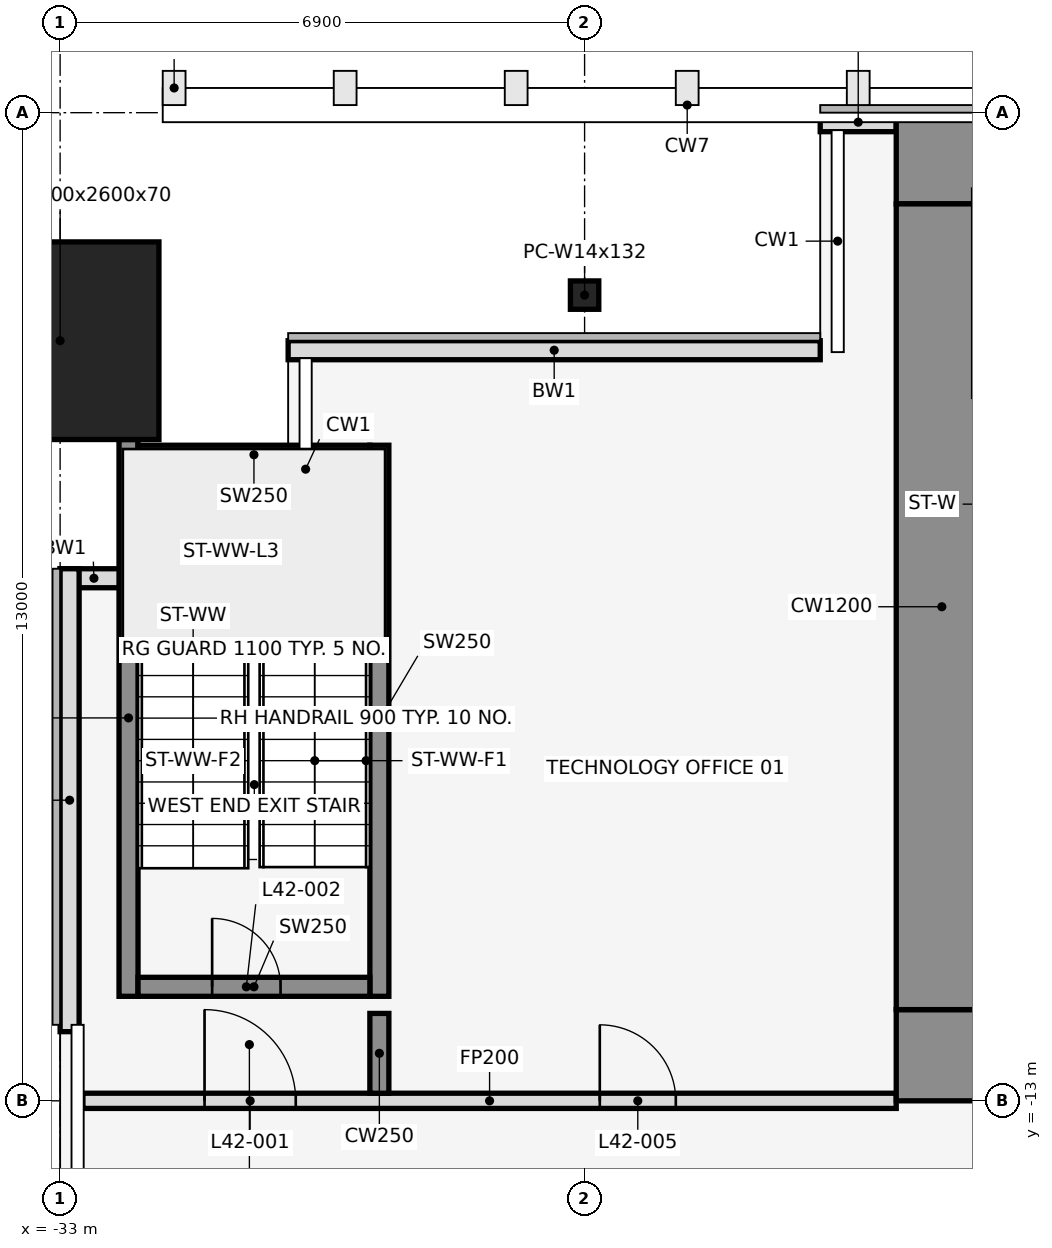
"""IFC4 building model, lengths in metres.
Left out: names, types, materials, properties, quantities, classifications, styles, units other than length and angle.
Written with IfcOpenShell. Run it as: python <this file> out.ifc"""

import sys

from ifc_helpers import new_model, si_unit, direction, frame, frame_2d, origin, origin_2d, place, context, subcontext, project, spatial, rectangle, hollow_rectangle, i_section, extrude, element, fill, save


model = new_model("IFC4")
c1 = context("Model", 3, precision=1e-05, world=origin(), true_north=direction((0.0, 1.0)))
c2 = subcontext(c1, "Body", "Model", "MODEL_VIEW")
j1 = project(units=[si_unit("LENGTHUNIT", "METRE"), si_unit("PLANEANGLEUNIT", "RADIAN")], contexts=[c1])
p1 = place(None, origin())
s1 = spatial("IfcSite", under=j1, at=p1, CompositionType="ELEMENT")
p2 = place(p1, origin())
s2 = spatial("IfcBuilding", under=s1, at=p2, CompositionType="ELEMENT")
p3 = place(p2, frame((0.0, 0.0, 190.9)))
s3 = spatial("IfcBuildingStorey", under=s2, at=p3, CompositionType="ELEMENT", Elevation=190.9)
p4 = place(p3, frame((-33.0, -3.0, 0.0), z_axis=(0.0, 0.0, 1.0), x_axis=(1.0, 0.0, 0.0)))
e1 = element("IfcColumn", 1, at=p4, inside=s3, PredefinedType="COLUMN", context=c2, shape_type="SweptSolid", body=[
    extrude(hollow_rectangle(XDim=2.6, YDim=2.6, WallThickness=0.07, at=origin_2d()), origin(), (0.0, 0.0, 1.0), 4.1),
])
p5 = place(p3, frame((-26.1, -2.4, 0.0), z_axis=(0.0, 0.0, 1.0), x_axis=(1.0, 0.0, 0.0)))
e2 = element("IfcColumn", 2, at=p5, inside=s3, PredefinedType="COLUMN", context=c2, shape_type="SweptSolid", body=[
    extrude(i_section(OverallWidth=0.373, OverallDepth=0.373, WebThickness=0.016, FlangeThickness=0.026, at=origin_2d()), origin(), (0.0, 0.0, 1.0), 4.1),
])
p6 = place(p3, frame((-22.0, -0.125, 0.0), z_axis=(0.0, 0.0, 1.0), x_axis=(-1.0, 0.0, 0.0)))
e3 = element("IfcWall", 3, at=p6, inside=s3, PredefinedType="STANDARD", context=c2, shape_type="SweptSolid", body=[
    extrude(rectangle(XDim=1.0, YDim=0.25, at=frame_2d((0.5, 0.0))), origin(), (0.0, 0.0, 1.0), 3.95),
])
p7 = place(p3, frame((-23.0, -3.125, 0.0), z_axis=(0.0, 0.0, 1.0), x_axis=(-1.0, 0.0, 0.0)))
e4 = element("IfcWall", 4, at=p7, inside=s3, PredefinedType="STANDARD", context=c2, shape_type="SweptSolid", body=[
    extrude(rectangle(XDim=7.0, YDim=0.25, at=frame_2d((3.5, 0.0))), origin(), (0.0, 0.0, 1.0), 3.95),
])
p8 = place(p3, frame((-32.11, -6.125, 0.0), z_axis=(0.0, 0.0, 1.0), x_axis=(-1.0, 0.0, 0.0)))
e5 = element("IfcWall", 5, at=p8, inside=s3, PredefinedType="STANDARD", context=c2, shape_type="SweptSolid", body=[
    extrude(rectangle(XDim=0.89, YDim=0.25, at=frame_2d((0.445, 0.0))), origin(), (0.0, 0.0, 1.0), 3.95),
])
p9 = place(p3, frame((-32.875, -6.0, 0.0), z_axis=(0.0, 0.0, 1.0), x_axis=(0.0, -1.0, 0.0)))
e6 = element("IfcWall", 6, at=p9, inside=s3, PredefinedType="STANDARD", context=c2, shape_type="SweptSolid", body=[
    extrude(rectangle(XDim=6.09, YDim=0.25, at=frame_2d((3.045, 0.0))), origin(), (0.0, 0.0, 1.0), 3.95),
])
p10 = place(p3, frame((-32.1, -11.625, 0.0), z_axis=(0.0, 0.0, 1.0), x_axis=(0.0, 1.0, 0.0)))
e7 = element("IfcWall", 7, at=p10, inside=s3, PredefinedType="SHEAR", context=c2, shape_type="SweptSolid", body=[
    extrude(rectangle(XDim=7.325, YDim=0.25, at=frame_2d((3.663, 0.0))), origin(), (0.0, 0.0, 1.0), 4.1),
])
p11 = place(p3, frame((-28.8, -11.625, 0.0), z_axis=(0.0, 0.0, 1.0), x_axis=(0.0, 1.0, 0.0)))
e8 = element("IfcWall", 8, at=p11, inside=s3, PredefinedType="SHEAR", context=c2, shape_type="SweptSolid", body=[
    extrude(rectangle(XDim=7.25, YDim=0.25, at=frame_2d((3.625, 0.0))), origin(), (0.0, 0.0, 1.0), 4.1),
])
p12 = place(p3, frame((-31.975, -11.5, 0.0), z_axis=(0.0, 0.0, 1.0), x_axis=(1.0, 0.0, 0.0)))
e9 = element("IfcWall", 9, at=p12, inside=s3, PredefinedType="SHEAR", context=c2, shape_type="SweptSolid", body=[
    extrude(rectangle(XDim=3.05, YDim=0.25, at=frame_2d((1.525, 0.0))), origin(), (0.0, 0.0, 1.0), 4.1),
])
p13 = place(p12, frame((0.975, 0.0, 0.0)))
e10 = element("IfcOpeningElement", 10, at=p13, cuts=e9, PredefinedType="OPENING", context=c2, shape_type="SweptSolid", body=[
    extrude(rectangle(XDim=0.9, YDim=2.1, at=frame_2d((0.45, 1.05))), frame((0.0, 0.137, 0.0), z_axis=(0.0, -1.0, 0.0), x_axis=(1.0, 0.0, 0.0)), (0.0, 0.0, 1.0), 0.274),
])
p14 = place(p3, frame((-31.975, -4.5, 0.0), z_axis=(0.0, 0.0, 1.0), x_axis=(1.0, 0.0, 0.0)))
e11 = element("IfcWall", 11, at=p14, inside=s3, PredefinedType="SHEAR", context=c2, shape_type="SweptSolid", body=[
    extrude(rectangle(XDim=3.05, YDim=0.25, at=frame_2d((1.525, 0.0))), origin(), (0.0, 0.0, 1.0), 4.1),
])
p15 = place(p3, frame((-32.7, -13.0, 0.0), z_axis=(0.0, 0.0, 1.0), x_axis=(1.0, 0.0, 0.0)))
e12 = element("IfcWall", 12, at=p15, inside=s3, PredefinedType="PARTITIONING", context=c2, shape_type="SweptSolid", body=[
    extrude(rectangle(XDim=10.7, YDim=0.2, at=frame_2d((5.35, 0.0))), origin(), (0.0, 0.0, 1.0), 2.96),
])
p16 = place(p15, frame((1.6, 0.0, 0.0)))
e13 = element("IfcOpeningElement", 13, at=p16, cuts=e12, PredefinedType="OPENING", context=c2, shape_type="SweptSolid", body=[
    extrude(rectangle(XDim=1.2, YDim=2.1, at=frame_2d((0.6, 1.05))), frame((0.0, 0.112, 0.0), z_axis=(0.0, -1.0, 0.0), x_axis=(1.0, 0.0, 0.0)), (0.0, 0.0, 1.0), 0.224),
])
p17 = place(p15, frame((6.8, 0.0, 0.0)))
e14 = element("IfcOpeningElement", 14, at=p17, cuts=e12, PredefinedType="OPENING", context=c2, shape_type="SweptSolid", body=[
    extrude(rectangle(XDim=1.0, YDim=2.1, at=frame_2d((0.5, 1.05))), frame((0.0, 0.112, 0.0), z_axis=(0.0, -1.0, 0.0), x_axis=(1.0, 0.0, 0.0)), (0.0, 0.0, 1.0), 0.224),
])
p18 = place(p3, frame((-28.8, -12.9, 0.0), z_axis=(0.0, 0.0, 1.0), x_axis=(0.0, 1.0, 0.0)))
e15 = element("IfcWall", 15, at=p18, inside=s3, PredefinedType="SHEAR", context=c2, shape_type="SweptSolid", body=[
    extrude(rectangle(XDim=1.05, YDim=0.25, at=frame_2d((0.525, 0.0))), origin(), (0.0, 0.0, 1.0), 4.1),
])
p19 = place(p3, frame((-22.0, -0.6, 0.0), z_axis=(0.0, 0.0, 1.0), x_axis=(1.0, 0.0, 0.0)))
e16 = element("IfcWall", 16, at=p19, inside=s3, PredefinedType="SHEAR", context=c2, shape_type="SweptSolid", body=[
    extrude(rectangle(XDim=44.0, YDim=1.2, at=frame_2d((22.0, 0.0))), origin(), (0.0, 0.0, 1.0), 4.1),
])
p20 = place(p19, frame((18.55, 0.0, 0.0)))
e17 = element("IfcOpeningElement", 17, at=p20, cuts=e16, PredefinedType="OPENING", context=c2, shape_type="SweptSolid", body=[
    extrude(rectangle(XDim=0.9, YDim=2.1, at=frame_2d((0.45, 1.05))), frame((0.0, 0.612, 0.0), z_axis=(0.0, -1.0, 0.0), x_axis=(1.0, 0.0, 0.0)), (0.0, 0.0, 1.0), 1.224),
])
p21 = place(p19, frame((24.55, 0.0, 0.0)))
e18 = element("IfcOpeningElement", 18, at=p21, cuts=e16, PredefinedType="OPENING", context=c2, shape_type="SweptSolid", body=[
    extrude(rectangle(XDim=0.9, YDim=2.1, at=frame_2d((0.45, 1.05))), frame((0.0, 0.612, 0.0), z_axis=(0.0, -1.0, 0.0), x_axis=(1.0, 0.0, 0.0)), (0.0, 0.0, 1.0), 1.224),
])
p22 = place(p3, frame((-22.0, -12.4, 0.0), z_axis=(0.0, 0.0, 1.0), x_axis=(1.0, 0.0, 0.0)))
e19 = element("IfcWall", 19, at=p22, inside=s3, PredefinedType="SHEAR", context=c2, shape_type="SweptSolid", body=[
    extrude(rectangle(XDim=44.0, YDim=1.2, at=frame_2d((22.0, 0.0))), origin(), (0.0, 0.0, 1.0), 4.1),
])
p23 = place(p22, frame((2.2, 0.0, 0.0)))
e20 = element("IfcOpeningElement", 20, at=p23, cuts=e19, PredefinedType="OPENING", context=c2, shape_type="SweptSolid", body=[
    extrude(rectangle(XDim=1.2, YDim=2.1, at=frame_2d((0.6, 1.05))), frame((0.0, 0.612, 0.0), z_axis=(0.0, -1.0, 0.0), x_axis=(1.0, 0.0, 0.0)), (0.0, 0.0, 1.0), 1.224),
])
p24 = place(p22, frame((21.4, 0.0, 0.0)))
e21 = element("IfcOpeningElement", 21, at=p24, cuts=e19, PredefinedType="OPENING", context=c2, shape_type="SweptSolid", body=[
    extrude(rectangle(XDim=1.2, YDim=2.1, at=frame_2d((0.6, 1.05))), frame((0.0, 0.612, 0.0), z_axis=(0.0, -1.0, 0.0), x_axis=(1.0, 0.0, 0.0)), (0.0, 0.0, 1.0), 1.224),
])
p25 = place(p22, frame((40.6, 0.0, 0.0)))
e22 = element("IfcOpeningElement", 22, at=p25, cuts=e19, PredefinedType="OPENING", context=c2, shape_type="SweptSolid", body=[
    extrude(rectangle(XDim=1.2, YDim=2.1, at=frame_2d((0.6, 1.05))), frame((0.0, 0.612, 0.0), z_axis=(0.0, -1.0, 0.0), x_axis=(1.0, 0.0, 0.0)), (0.0, 0.0, 1.0), 1.224),
])
p26 = place(p22, frame((16.0, 0.0, 0.0)))
e23 = element("IfcOpeningElement", 23, at=p26, cuts=e19, PredefinedType="OPENING", context=c2, shape_type="SweptSolid", body=[
    extrude(rectangle(XDim=1.8, YDim=2.1, at=frame_2d((0.9, 1.05))), frame((0.0, 0.612, 0.0), z_axis=(0.0, -1.0, 0.0), x_axis=(1.0, 0.0, 0.0)), (0.0, 0.0, 1.0), 1.224),
])
p27 = place(p22, frame((6.3, 0.0, 0.0)))
e24 = element("IfcOpeningElement", 24, at=p27, cuts=e19, PredefinedType="OPENING", context=c2, shape_type="SweptSolid", body=[
    extrude(rectangle(XDim=1.2, YDim=2.1, at=frame_2d((0.6, 1.05))), frame((0.0, 0.612, 0.0), z_axis=(0.0, -1.0, 0.0), x_axis=(1.0, 0.0, 0.0)), (0.0, 0.0, 1.0), 1.224),
])
p28 = place(p22, frame((26.2, 0.0, 0.0)))
e25 = element("IfcOpeningElement", 25, at=p28, cuts=e19, PredefinedType="OPENING", context=c2, shape_type="SweptSolid", body=[
    extrude(rectangle(XDim=1.8, YDim=2.1, at=frame_2d((0.9, 1.05))), frame((0.0, 0.612, 0.0), z_axis=(0.0, -1.0, 0.0), x_axis=(1.0, 0.0, 0.0)), (0.0, 0.0, 1.0), 1.224),
])
p29 = place(p22, frame((36.5, 0.0, 0.0)))
e26 = element("IfcOpeningElement", 26, at=p29, cuts=e19, PredefinedType="OPENING", context=c2, shape_type="SweptSolid", body=[
    extrude(rectangle(XDim=1.2, YDim=2.1, at=frame_2d((0.6, 1.05))), frame((0.0, 0.612, 0.0), z_axis=(0.0, -1.0, 0.0), x_axis=(1.0, 0.0, 0.0)), (0.0, 0.0, 1.0), 1.224),
])
p30 = place(p3, frame((-21.4, -11.8, 0.0), z_axis=(0.0, 0.0, 1.0), x_axis=(0.0, 1.0, 0.0)))
e27 = element("IfcWall", 27, at=p30, inside=s3, PredefinedType="SHEAR", context=c2, shape_type="SweptSolid", body=[
    extrude(rectangle(XDim=10.6, YDim=1.2, at=frame_2d((5.3, 0.0))), origin(), (0.0, 0.0, 1.0), 4.1),
])
p31 = place(p16, origin())
e28 = element("IfcDoor", 28, at=p31, inside=s3, OperationType="SINGLE_SWING_LEFT", PredefinedType="DOOR", context=c2, shape_type="SweptSolid", body=[
    extrude(rectangle(XDim=1.2, YDim=2.1, at=frame_2d((0.6, 1.05))), frame((0.0, 0.025, 0.0), z_axis=(0.0, -1.0, 0.0), x_axis=(1.0, 0.0, 0.0)), (0.0, 0.0, 1.0), 0.05),
])
fill(e13, e28)
p32 = place(p13, origin())
e29 = element("IfcDoor", 29, at=p32, inside=s3, OperationType="SINGLE_SWING_LEFT", PredefinedType="DOOR", context=c2, shape_type="SweptSolid", body=[
    extrude(rectangle(XDim=0.9, YDim=2.1, at=frame_2d((0.45, 1.05))), frame((0.0, 0.025, 0.0), z_axis=(0.0, -1.0, 0.0), x_axis=(1.0, 0.0, 0.0)), (0.0, 0.0, 1.0), 0.05),
])
fill(e10, e29)
p33 = place(p17, origin())
e30 = element("IfcDoor", 30, at=p33, inside=s3, OperationType="SINGLE_SWING_LEFT", PredefinedType="DOOR", context=c2, shape_type="SweptSolid", body=[
    extrude(rectangle(XDim=1.0, YDim=2.1, at=frame_2d((0.5, 1.05))), frame((0.0, 0.025, 0.0), z_axis=(0.0, -1.0, 0.0), x_axis=(1.0, 0.0, 0.0)), (0.0, 0.0, 1.0), 0.05),
])
fill(e14, e30)
save(model, sys.argv[1])
